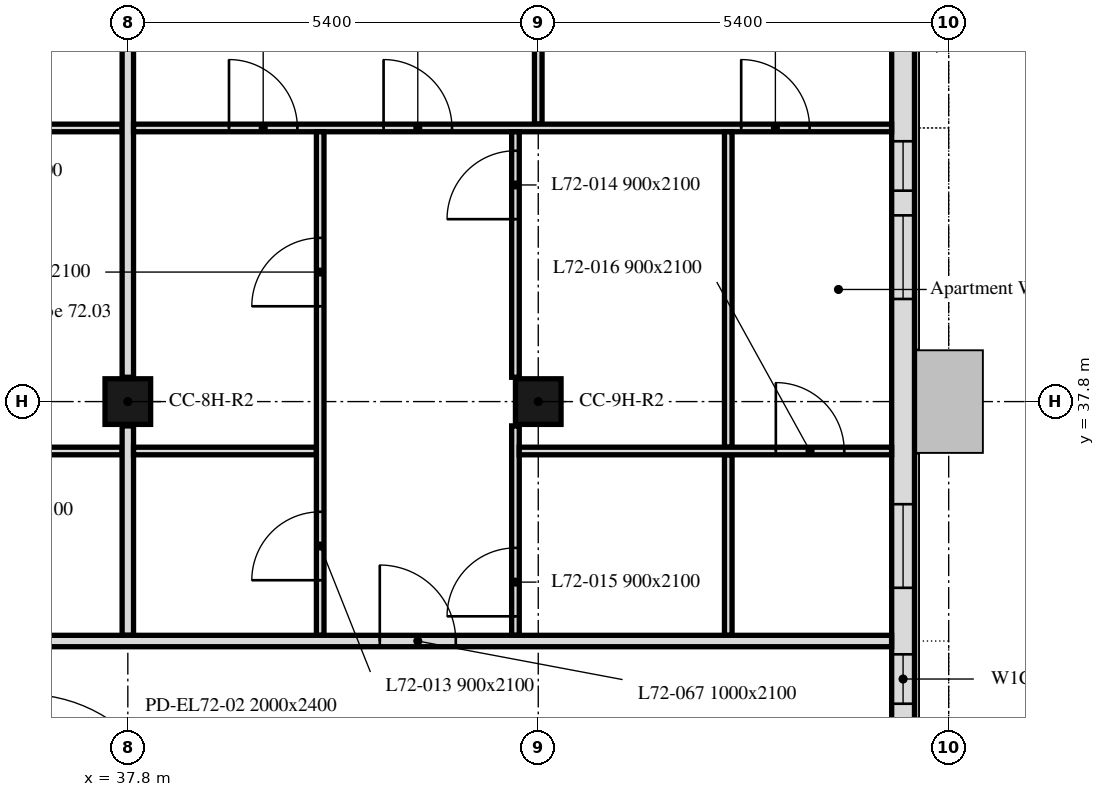
"""IFC4 building model, lengths in metres.
Left out: names, types, materials, properties, quantities, classifications, styles, units other than length and angle.
Written with IfcOpenShell. Run it as: python <this file> out.ifc"""

import sys

from ifc_helpers import new_model, si_unit, direction, frame, frame_2d, origin, origin_2d, place, context, subcontext, project, spatial, rectangle, extrude, element, fill, save


model = new_model("IFC4")
c1 = context("Model", 3, precision=1e-05, world=origin(), true_north=direction((0.0, 1.0)))
c2 = subcontext(c1, "Body", "Model", "MODEL_VIEW")
j1 = project(units=[si_unit("LENGTHUNIT", "METRE"), si_unit("PLANEANGLEUNIT", "RADIAN")], contexts=[c1])
p1 = place(None, origin())
s1 = spatial("IfcSite", under=j1, at=p1, CompositionType="ELEMENT")
p2 = place(p1, origin())
s2 = spatial("IfcBuilding", under=s1, at=p2, CompositionType="ELEMENT")
p3 = place(p2, frame((0.0, 0.0, 291.7)))
s3 = spatial("IfcBuildingStorey", under=s2, at=p3, CompositionType="ELEMENT", Elevation=291.7)
for number, where, z_axis, x_axis in (
    (1, (37.8, 37.8, 0.0), (0.0, 0.0, 1.0), (1.0, 0.0, 0.0)),
    (2, (43.2, 37.8, 0.0), (0.0, 0.0, 1.0), (1.0, 0.0, 0.0)),
):
    element("IfcColumn", number, at=place(p3, frame(where, z_axis=z_axis, x_axis=x_axis)), inside=s3, PredefinedType="COLUMN", context=c2, shape_type="SweptSolid", body=[
        extrude(rectangle(XDim=0.6, YDim=0.6, at=origin_2d()), origin(), (0.0, 0.0, 1.0), 3.0),
    ])
p4 = place(p3, frame((48.0, 10.986, 0.0), z_axis=(0.0, 0.0, 1.0), x_axis=(0.0, 1.0, 0.0)))
e3 = element("IfcWall", 3, at=p4, inside=s3, PredefinedType="SOLIDWALL", context=c2, shape_type="SweptSolid", body=[
    extrude(rectangle(XDim=32.027, YDim=0.3, at=frame_2d((16.014, 0.0))), origin(), (0.0, 0.0, 1.0), 3.0),
])
p5 = place(p4, frame((1.164, 0.0, 0.9)))
e4 = element("IfcOpeningElement", 4, at=p5, cuts=e3, PredefinedType="OPENING", context=c2, shape_type="SweptSolid", body=[
    extrude(rectangle(XDim=1.1, YDim=1.7, at=frame_2d((0.55, 0.85))), frame((0.0, 0.16, 0.0), z_axis=(0.0, -1.0, 0.0), x_axis=(1.0, 0.0, 0.0)), (0.0, 0.0, 1.0), 0.32),
])
p6 = place(p4, frame((3.114, 0.0, 0.9)))
e5 = element("IfcOpeningElement", 5, at=p6, cuts=e3, PredefinedType="OPENING", context=c2, shape_type="SweptSolid", body=[
    extrude(rectangle(XDim=1.1, YDim=1.7, at=frame_2d((0.55, 0.85))), frame((0.0, 0.16, 0.0), z_axis=(0.0, -1.0, 0.0), x_axis=(1.0, 0.0, 0.0)), (0.0, 0.0, 1.0), 0.32),
])
p7 = place(p4, frame((6.214, 0.0, 0.9)))
e6 = element("IfcOpeningElement", 6, at=p7, cuts=e3, PredefinedType="OPENING", context=c2, shape_type="SweptSolid", body=[
    extrude(rectangle(XDim=3.4, YDim=1.7, at=frame_2d((1.7, 0.85))), frame((0.0, 0.16, 0.0), z_axis=(0.0, -1.0, 0.0), x_axis=(1.0, 0.0, 0.0)), (0.0, 0.0, 1.0), 0.32),
])
p8 = place(p4, frame((11.964, 0.0, 0.9)))
e7 = element("IfcOpeningElement", 7, at=p8, cuts=e3, PredefinedType="OPENING", context=c2, shape_type="SweptSolid", body=[
    extrude(rectangle(XDim=1.1, YDim=1.7, at=frame_2d((0.55, 0.85))), frame((0.0, 0.16, 0.0), z_axis=(0.0, -1.0, 0.0), x_axis=(1.0, 0.0, 0.0)), (0.0, 0.0, 1.0), 0.32),
])
p9 = place(p4, frame((13.564, 0.0, 0.9)))
e8 = element("IfcOpeningElement", 8, at=p9, cuts=e3, PredefinedType="OPENING", context=c2, shape_type="SweptSolid", body=[
    extrude(rectangle(XDim=1.1, YDim=1.7, at=frame_2d((0.55, 0.85))), frame((0.0, 0.16, 0.0), z_axis=(0.0, -1.0, 0.0), x_axis=(1.0, 0.0, 0.0)), (0.0, 0.0, 1.0), 0.32),
])
p10 = place(p4, frame((17.014, 0.0, 0.9)))
e9 = element("IfcOpeningElement", 9, at=p10, cuts=e3, PredefinedType="OPENING", context=c2, shape_type="SweptSolid", body=[
    extrude(rectangle(XDim=3.4, YDim=1.7, at=frame_2d((1.7, 0.85))), frame((0.0, 0.16, 0.0), z_axis=(0.0, -1.0, 0.0), x_axis=(1.0, 0.0, 0.0)), (0.0, 0.0, 1.0), 0.32),
])
p11 = place(p4, frame((22.839, 0.0, 0.9)))
e10 = element("IfcOpeningElement", 10, at=p11, cuts=e3, PredefinedType="OPENING", context=c2, shape_type="SweptSolid", body=[
    extrude(rectangle(XDim=0.65, YDim=1.7, at=frame_2d((0.325, 0.85))), frame((0.0, 0.16, 0.0), z_axis=(0.0, -1.0, 0.0), x_axis=(1.0, 0.0, 0.0)), (0.0, 0.0, 1.0), 0.32),
])
p12 = place(p4, frame((24.364, 0.0, 0.9)))
e11 = element("IfcOpeningElement", 11, at=p12, cuts=e3, PredefinedType="OPENING", context=c2, shape_type="SweptSolid", body=[
    extrude(rectangle(XDim=1.1, YDim=1.7, at=frame_2d((0.55, 0.85))), frame((0.0, 0.16, 0.0), z_axis=(0.0, -1.0, 0.0), x_axis=(1.0, 0.0, 0.0)), (0.0, 0.0, 1.0), 0.32),
])
p13 = place(p4, frame((28.164, 0.0, 0.9)))
e12 = element("IfcOpeningElement", 12, at=p13, cuts=e3, PredefinedType="OPENING", context=c2, shape_type="SweptSolid", body=[
    extrude(rectangle(XDim=1.1, YDim=1.7, at=frame_2d((0.55, 0.85))), frame((0.0, 0.16, 0.0), z_axis=(0.0, -1.0, 0.0), x_axis=(1.0, 0.0, 0.0)), (0.0, 0.0, 1.0), 0.32),
])
p14 = place(p4, frame((29.589, 0.0, 0.9)))
e13 = element("IfcOpeningElement", 13, at=p14, cuts=e3, PredefinedType="OPENING", context=c2, shape_type="SweptSolid", body=[
    extrude(rectangle(XDim=0.65, YDim=1.7, at=frame_2d((0.325, 0.85))), frame((0.0, 0.16, 0.0), z_axis=(0.0, -1.0, 0.0), x_axis=(1.0, 0.0, 0.0)), (0.0, 0.0, 1.0), 0.32),
])
p15 = place(p3, frame((32.37, 41.4, 0.0), z_axis=(0.0, 0.0, 1.0), x_axis=(1.0, 0.0, 0.0)))
e14 = element("IfcWall", 14, at=p15, inside=s3, PredefinedType="PARTITIONING", context=c2, shape_type="SweptSolid", body=[
    extrude(rectangle(XDim=5.355, YDim=0.1, at=frame_2d((2.677, 0.0))), origin(), (0.0, 0.0, 1.0), 3.0),
])
p16 = place(p15, frame((2.578, 0.0, 0.0)))
e15 = element("IfcOpeningElement", 15, at=p16, cuts=e14, PredefinedType="OPENING", context=c2, shape_type="SweptSolid", body=[
    extrude(rectangle(XDim=0.9, YDim=2.1, at=frame_2d((0.45, 1.05))), frame((0.0, 0.05, 0.0), z_axis=(0.0, -1.0, 0.0), x_axis=(1.0, 0.0, 0.0)), (0.0, 0.0, 1.0), 0.1),
])
p17 = place(p3, frame((32.47, 37.15, 0.0), z_axis=(0.0, 0.0, 1.0), x_axis=(1.0, 0.0, 0.0)))
e16 = element("IfcWall", 16, at=p17, inside=s3, PredefinedType="PARTITIONING", context=c2, shape_type="SweptSolid", body=[
    extrude(rectangle(XDim=5.255, YDim=0.1, at=frame_2d((2.627, 0.0))), origin(), (0.0, 0.0, 1.0), 3.0),
])
p18 = place(p17, frame((2.406, 0.0, 0.0)))
e17 = element("IfcOpeningElement", 17, at=p18, cuts=e16, PredefinedType="OPENING", context=c2, shape_type="SweptSolid", body=[
    extrude(rectangle(XDim=0.9, YDim=2.1, at=frame_2d((0.45, 1.05))), frame((0.0, 0.05, 0.0), z_axis=(0.0, -1.0, 0.0), x_axis=(1.0, 0.0, 0.0)), (0.0, 0.0, 1.0), 0.1),
])
p19 = place(p3, frame((37.8, 38.12, 0.0), z_axis=(0.0, 0.0, 1.0), x_axis=(0.0, 1.0, 0.0)))
e18 = element("IfcWall", 18, at=p19, inside=s3, PredefinedType="PARTITIONING", context=c2, shape_type="SweptSolid", body=[
    extrude(rectangle(XDim=4.76, YDim=0.15, at=frame_2d((2.38, 0.0))), origin(), (0.0, 0.0, 1.0), 2.4),
])
p20 = place(p3, frame((37.8, 34.725, 0.0), z_axis=(0.0, 0.0, 1.0), x_axis=(0.0, 1.0, 0.0)))
e19 = element("IfcWall", 19, at=p20, inside=s3, PredefinedType="PARTITIONING", context=c2, shape_type="SweptSolid", body=[
    extrude(rectangle(XDim=2.755, YDim=0.15, at=frame_2d((1.377, 0.0))), origin(), (0.0, 0.0, 1.0), 2.4),
])
p21 = place(p3, frame((43.2, 41.45, 0.0), z_axis=(0.0, 0.0, 1.0), x_axis=(0.0, 1.0, 0.0)))
e20 = element("IfcWall", 20, at=p21, inside=s3, PredefinedType="PARTITIONING", context=c2, shape_type="SweptSolid", body=[
    extrude(rectangle(XDim=6.038, YDim=0.1, at=frame_2d((3.019, 0.0))), origin(), (0.0, 0.0, 1.0), 3.0),
])
p22 = place(p21, frame((3.1, 0.0, 0.0)))
e21 = element("IfcOpeningElement", 21, at=p22, cuts=e20, PredefinedType="OPENING", context=c2, shape_type="SweptSolid", body=[
    extrude(rectangle(XDim=0.9, YDim=2.1, at=frame_2d((0.45, 1.05))), frame((0.0, 0.05, 0.0), z_axis=(0.0, -1.0, 0.0), x_axis=(1.0, 0.0, 0.0)), (0.0, 0.0, 1.0), 0.1),
])
p23 = place(p3, frame((37.875, 41.4, 0.0), z_axis=(0.0, 0.0, 1.0), x_axis=(1.0, 0.0, 0.0)))
e22 = element("IfcWall", 22, at=p23, inside=s3, PredefinedType="PARTITIONING", context=c2, shape_type="SweptSolid", body=[
    extrude(rectangle(XDim=9.974, YDim=0.1, at=frame_2d((4.987, 0.0))), origin(), (0.0, 0.0, 1.0), 3.0),
])
p24 = place(p23, frame((1.256, 0.0, 0.0)))
e23 = element("IfcOpeningElement", 23, at=p24, cuts=e22, PredefinedType="OPENING", context=c2, shape_type="SweptSolid", body=[
    extrude(rectangle(XDim=0.9, YDim=2.1, at=frame_2d((0.45, 1.05))), frame((0.0, 0.05, 0.0), z_axis=(0.0, -1.0, 0.0), x_axis=(1.0, 0.0, 0.0)), (0.0, 0.0, 1.0), 0.1),
])
p25 = place(p23, frame((7.995, 0.0, 0.0)))
e24 = element("IfcOpeningElement", 24, at=p25, cuts=e22, PredefinedType="OPENING", context=c2, shape_type="SweptSolid", body=[
    extrude(rectangle(XDim=0.9, YDim=2.1, at=frame_2d((0.45, 1.05))), frame((0.0, 0.05, 0.0), z_axis=(0.0, -1.0, 0.0), x_axis=(1.0, 0.0, 0.0)), (0.0, 0.0, 1.0), 0.1),
])
p26 = place(p23, frame((3.29, 0.0, 0.0)))
e25 = element("IfcOpeningElement", 25, at=p26, cuts=e22, PredefinedType="OPENING", context=c2, shape_type="SweptSolid", body=[
    extrude(rectangle(XDim=0.9, YDim=2.1, at=frame_2d((0.45, 1.05))), frame((0.0, 0.05, 0.0), z_axis=(0.0, -1.0, 0.0), x_axis=(1.0, 0.0, 0.0)), (0.0, 0.0, 1.0), 0.1),
])
p27 = place(p3, frame((37.875, 37.15, 0.0), z_axis=(0.0, 0.0, 1.0), x_axis=(1.0, 0.0, 0.0)))
e26 = element("IfcWall", 26, at=p27, inside=s3, PredefinedType="PARTITIONING", context=c2, shape_type="SweptSolid", body=[
    extrude(rectangle(XDim=2.406, YDim=0.1, at=frame_2d((1.203, 0.0))), origin(), (0.0, 0.0, 1.0), 3.0),
])
p28 = place(p3, frame((40.331, 34.725, 0.0), z_axis=(0.0, 0.0, 1.0), x_axis=(0.0, 1.0, 0.0)))
e27 = element("IfcWall", 27, at=p28, inside=s3, PredefinedType="PARTITIONING", context=c2, shape_type="SweptSolid", body=[
    extrude(rectangle(XDim=6.625, YDim=0.1, at=frame_2d((3.312, 0.0))), origin(), (0.0, 0.0, 1.0), 2.4),
])
p29 = place(p28, frame((0.725, 0.0, 0.0)))
e28 = element("IfcOpeningElement", 28, at=p29, cuts=e27, PredefinedType="OPENING", context=c2, shape_type="SweptSolid", body=[
    extrude(rectangle(XDim=0.9, YDim=2.1, at=frame_2d((0.45, 1.05))), frame((0.0, 0.05, 0.0), z_axis=(0.0, -1.0, 0.0), x_axis=(1.0, 0.0, 0.0)), (0.0, 0.0, 1.0), 0.1),
])
p30 = place(p28, frame((4.329, 0.0, 0.0)))
e29 = element("IfcOpeningElement", 29, at=p30, cuts=e27, PredefinedType="OPENING", context=c2, shape_type="SweptSolid", body=[
    extrude(rectangle(XDim=0.9, YDim=2.1, at=frame_2d((0.45, 1.05))), frame((0.0, 0.05, 0.0), z_axis=(0.0, -1.0, 0.0), x_axis=(1.0, 0.0, 0.0)), (0.0, 0.0, 1.0), 0.1),
])
p31 = place(p3, frame((42.9, 34.725, 0.0), z_axis=(0.0, 0.0, 1.0), x_axis=(0.0, 1.0, 0.0)))
e30 = element("IfcWall", 30, at=p31, inside=s3, PredefinedType="PARTITIONING", context=c2, shape_type="SweptSolid", body=[
    extrude(rectangle(XDim=2.755, YDim=0.1, at=frame_2d((1.377, 0.0))), origin(), (0.0, 0.0, 1.0), 3.0),
])
p32 = place(p31, frame((0.25, 0.0, 0.0)))
e31 = element("IfcOpeningElement", 31, at=p32, cuts=e30, PredefinedType="OPENING", context=c2, shape_type="SweptSolid", body=[
    extrude(rectangle(XDim=0.9, YDim=2.1, at=frame_2d((0.45, 1.05))), frame((0.0, 0.05, 0.0), z_axis=(0.0, -1.0, 0.0), x_axis=(1.0, 0.0, 0.0)), (0.0, 0.0, 1.0), 0.1),
])
p33 = place(p3, frame((42.9, 38.12, 0.0), z_axis=(0.0, 0.0, 1.0), x_axis=(0.0, 1.0, 0.0)))
e32 = element("IfcWall", 32, at=p33, inside=s3, PredefinedType="PARTITIONING", context=c2, shape_type="SweptSolid", body=[
    extrude(rectangle(XDim=3.23, YDim=0.1, at=frame_2d((1.615, 0.0))), origin(), (0.0, 0.0, 1.0), 3.0),
])
p34 = place(p33, frame((2.08, 0.0, 0.0)))
e33 = element("IfcOpeningElement", 33, at=p34, cuts=e32, PredefinedType="OPENING", context=c2, shape_type="SweptSolid", body=[
    extrude(rectangle(XDim=0.9, YDim=2.1, at=frame_2d((0.45, 1.05))), frame((0.0, 0.05, 0.0), z_axis=(0.0, -1.0, 0.0), x_axis=(1.0, 0.0, 0.0)), (0.0, 0.0, 1.0), 0.1),
])
p35 = place(p3, frame((45.7, 37.2, 0.0), z_axis=(0.0, 0.0, 1.0), x_axis=(0.0, 1.0, 0.0)))
e34 = element("IfcWall", 34, at=p35, inside=s3, PredefinedType="PARTITIONING", context=c2, shape_type="SweptSolid", body=[
    extrude(rectangle(XDim=4.15, YDim=0.1, at=frame_2d((2.075, 0.0))), origin(), (0.0, 0.0, 1.0), 2.4),
])
p36 = place(p3, frame((45.7, 34.725, 0.0), z_axis=(0.0, 0.0, 1.0), x_axis=(0.0, 1.0, 0.0)))
e35 = element("IfcWall", 35, at=p36, inside=s3, PredefinedType="PARTITIONING", context=c2, shape_type="SweptSolid", body=[
    extrude(rectangle(XDim=2.375, YDim=0.1, at=frame_2d((1.188, 0.0))), origin(), (0.0, 0.0, 1.0), 3.0),
])
p37 = place(p3, frame((42.95, 37.15, 0.0), z_axis=(0.0, 0.0, 1.0), x_axis=(1.0, 0.0, 0.0)))
e36 = element("IfcWall", 36, at=p37, inside=s3, PredefinedType="PARTITIONING", context=c2, shape_type="SweptSolid", body=[
    extrude(rectangle(XDim=4.899, YDim=0.1, at=frame_2d((2.45, 0.0))), origin(), (0.0, 0.0, 1.0), 3.0),
])
p38 = place(p37, frame((3.376, 0.0, 0.0)))
e37 = element("IfcOpeningElement", 37, at=p38, cuts=e36, PredefinedType="OPENING", context=c2, shape_type="SweptSolid", body=[
    extrude(rectangle(XDim=0.9, YDim=2.1, at=frame_2d((0.45, 1.05))), frame((0.0, 0.05, 0.0), z_axis=(0.0, -1.0, 0.0), x_axis=(1.0, 0.0, 0.0)), (0.0, 0.0, 1.0), 0.1),
])
p39 = place(p3, frame((6.151, 34.65, 0.0), z_axis=(0.0, 0.0, 1.0), x_axis=(1.0, 0.0, 0.0)))
e38 = element("IfcWall", 38, at=p39, inside=s3, PredefinedType="PARTITIONING", context=c2, shape_type="SweptSolid", body=[
    extrude(rectangle(XDim=41.698, YDim=0.15, at=frame_2d((20.849, 0.0))), origin(), (0.0, 0.0, 1.0), 2.4),
])
p40 = place(p39, frame((2.969, 0.0, 0.0)))
e39 = element("IfcOpeningElement", 39, at=p40, cuts=e38, PredefinedType="OPENING", context=c2, shape_type="SweptSolid", body=[
    extrude(rectangle(XDim=1.0, YDim=2.1, at=frame_2d((0.5, 1.05))), frame((0.0, 0.075, 0.0), z_axis=(0.0, -1.0, 0.0), x_axis=(1.0, 0.0, 0.0)), (0.0, 0.0, 1.0), 0.15),
])
p41 = place(p39, frame((12.944, 0.0, 0.0)))
e40 = element("IfcOpeningElement", 40, at=p41, cuts=e38, PredefinedType="OPENING", context=c2, shape_type="SweptSolid", body=[
    extrude(rectangle(XDim=1.0, YDim=2.1, at=frame_2d((0.5, 1.05))), frame((0.0, 0.075, 0.0), z_axis=(0.0, -1.0, 0.0), x_axis=(1.0, 0.0, 0.0)), (0.0, 0.0, 1.0), 0.15),
])
p42 = place(p39, frame((24.444, 0.0, 0.0)))
e41 = element("IfcOpeningElement", 41, at=p42, cuts=e38, PredefinedType="OPENING", context=c2, shape_type="SweptSolid", body=[
    extrude(rectangle(XDim=1.0, YDim=2.1, at=frame_2d((0.5, 1.05))), frame((0.0, 0.075, 0.0), z_axis=(0.0, -1.0, 0.0), x_axis=(1.0, 0.0, 0.0)), (0.0, 0.0, 1.0), 0.15),
])
p43 = place(p39, frame((34.964, 0.0, 0.0)))
e42 = element("IfcOpeningElement", 42, at=p43, cuts=e38, PredefinedType="OPENING", context=c2, shape_type="SweptSolid", body=[
    extrude(rectangle(XDim=1.0, YDim=2.1, at=frame_2d((0.5, 1.05))), frame((0.0, 0.075, 0.0), z_axis=(0.0, -1.0, 0.0), x_axis=(1.0, 0.0, 0.0)), (0.0, 0.0, 1.0), 0.15),
])
p44 = place(p11, origin())
e43 = element("IfcWindow", 43, at=p44, inside=s3, PartitioningType="SINGLE_PANEL", PredefinedType="WINDOW", context=c2, shape_type="SweptSolid", body=[
    extrude(rectangle(XDim=0.65, YDim=1.7, at=frame_2d((0.325, 0.85))), frame((0.0, 0.03, 0.0), z_axis=(0.0, -1.0, 0.0), x_axis=(1.0, 0.0, 0.0)), (0.0, 0.0, 1.0), 0.06),
])
fill(e10, e43)
p45 = place(p12, origin())
e44 = element("IfcWindow", 44, at=p45, inside=s3, PartitioningType="SINGLE_PANEL", PredefinedType="WINDOW", context=c2, shape_type="SweptSolid", body=[
    extrude(rectangle(XDim=1.1, YDim=1.7, at=frame_2d((0.55, 0.85))), frame((0.0, 0.03, 0.0), z_axis=(0.0, -1.0, 0.0), x_axis=(1.0, 0.0, 0.0)), (0.0, 0.0, 1.0), 0.06),
])
fill(e11, e44)
p46 = place(p13, origin())
e45 = element("IfcWindow", 45, at=p46, inside=s3, PartitioningType="SINGLE_PANEL", PredefinedType="WINDOW", context=c2, shape_type="SweptSolid", body=[
    extrude(rectangle(XDim=1.1, YDim=1.7, at=frame_2d((0.55, 0.85))), frame((0.0, 0.03, 0.0), z_axis=(0.0, -1.0, 0.0), x_axis=(1.0, 0.0, 0.0)), (0.0, 0.0, 1.0), 0.06),
])
fill(e12, e45)
p47 = place(p14, origin())
e46 = element("IfcWindow", 46, at=p47, inside=s3, PartitioningType="SINGLE_PANEL", PredefinedType="WINDOW", context=c2, shape_type="SweptSolid", body=[
    extrude(rectangle(XDim=0.65, YDim=1.7, at=frame_2d((0.325, 0.85))), frame((0.0, 0.03, 0.0), z_axis=(0.0, -1.0, 0.0), x_axis=(1.0, 0.0, 0.0)), (0.0, 0.0, 1.0), 0.06),
])
fill(e13, e46)
p48 = place(p29, origin())
e47 = element("IfcDoor", 47, at=p48, inside=s3, OperationType="SINGLE_SWING_RIGHT", PredefinedType="DOOR", context=c2, shape_type="SweptSolid", body=[
    extrude(rectangle(XDim=0.9, YDim=2.1, at=frame_2d((0.45, 1.05))), frame((0.0, 0.025, 0.0), z_axis=(0.0, -1.0, 0.0), x_axis=(1.0, 0.0, 0.0)), (0.0, 0.0, 1.0), 0.05),
])
fill(e28, e47)
p49 = place(p34, origin())
e48 = element("IfcDoor", 48, at=p49, inside=s3, OperationType="SINGLE_SWING_LEFT", PredefinedType="DOOR", context=c2, shape_type="SweptSolid", body=[
    extrude(rectangle(XDim=0.9, YDim=2.1, at=frame_2d((0.45, 1.05))), frame((0.0, 0.025, 0.0), z_axis=(0.0, -1.0, 0.0), x_axis=(1.0, 0.0, 0.0)), (0.0, 0.0, 1.0), 0.05),
])
fill(e33, e48)
p50 = place(p32, origin())
e49 = element("IfcDoor", 49, at=p50, inside=s3, OperationType="SINGLE_SWING_LEFT", PredefinedType="DOOR", context=c2, shape_type="SweptSolid", body=[
    extrude(rectangle(XDim=0.9, YDim=2.1, at=frame_2d((0.45, 1.05))), frame((0.0, 0.025, 0.0), z_axis=(0.0, -1.0, 0.0), x_axis=(1.0, 0.0, 0.0)), (0.0, 0.0, 1.0), 0.05),
])
fill(e31, e49)
p51 = place(p38, origin())
e50 = element("IfcDoor", 50, at=p51, inside=s3, OperationType="SINGLE_SWING_LEFT", PredefinedType="DOOR", context=c2, shape_type="SweptSolid", body=[
    extrude(rectangle(XDim=0.9, YDim=2.1, at=frame_2d((0.45, 1.05))), frame((0.0, 0.025, 0.0), z_axis=(0.0, -1.0, 0.0), x_axis=(1.0, 0.0, 0.0)), (0.0, 0.0, 1.0), 0.05),
])
fill(e37, e50)
p52 = place(p24, origin())
e51 = element("IfcDoor", 51, at=p52, inside=s3, OperationType="SINGLE_SWING_RIGHT", PredefinedType="DOOR", context=c2, shape_type="SweptSolid", body=[
    extrude(rectangle(XDim=0.9, YDim=2.1, at=frame_2d((0.45, 1.05))), frame((0.0, 0.025, 0.0), z_axis=(0.0, -1.0, 0.0), x_axis=(1.0, 0.0, 0.0)), (0.0, 0.0, 1.0), 0.05),
])
fill(e23, e51)
p53 = place(p25, origin())
e52 = element("IfcDoor", 52, at=p53, inside=s3, OperationType="SINGLE_SWING_LEFT", PredefinedType="DOOR", context=c2, shape_type="SweptSolid", body=[
    extrude(rectangle(XDim=0.9, YDim=2.1, at=frame_2d((0.45, 1.05))), frame((0.0, 0.025, 0.0), z_axis=(0.0, -1.0, 0.0), x_axis=(1.0, 0.0, 0.0)), (0.0, 0.0, 1.0), 0.05),
])
fill(e24, e52)
p54 = place(p30, origin())
e53 = element("IfcDoor", 53, at=p54, inside=s3, OperationType="SINGLE_SWING_LEFT", PredefinedType="DOOR", context=c2, shape_type="SweptSolid", body=[
    extrude(rectangle(XDim=0.9, YDim=2.1, at=frame_2d((0.45, 1.05))), frame((0.0, 0.025, 0.0), z_axis=(0.0, -1.0, 0.0), x_axis=(1.0, 0.0, 0.0)), (0.0, 0.0, 1.0), 0.05),
])
fill(e29, e53)
p55 = place(p26, origin())
e54 = element("IfcDoor", 54, at=p55, inside=s3, OperationType="SINGLE_SWING_LEFT", PredefinedType="DOOR", context=c2, shape_type="SweptSolid", body=[
    extrude(rectangle(XDim=0.9, YDim=2.1, at=frame_2d((0.45, 1.05))), frame((0.0, 0.025, 0.0), z_axis=(0.0, -1.0, 0.0), x_axis=(1.0, 0.0, 0.0)), (0.0, 0.0, 1.0), 0.05),
])
fill(e25, e54)
p56 = place(p43, origin())
e55 = element("IfcDoor", 55, at=p56, inside=s3, OperationType="SINGLE_SWING_LEFT", PredefinedType="DOOR", context=c2, shape_type="SweptSolid", body=[
    extrude(rectangle(XDim=1.0, YDim=2.1, at=frame_2d((0.5, 1.05))), frame((0.0, 0.025, 0.0), z_axis=(0.0, -1.0, 0.0), x_axis=(1.0, 0.0, 0.0)), (0.0, 0.0, 1.0), 0.05),
])
fill(e42, e55)
save(model, sys.argv[1])
